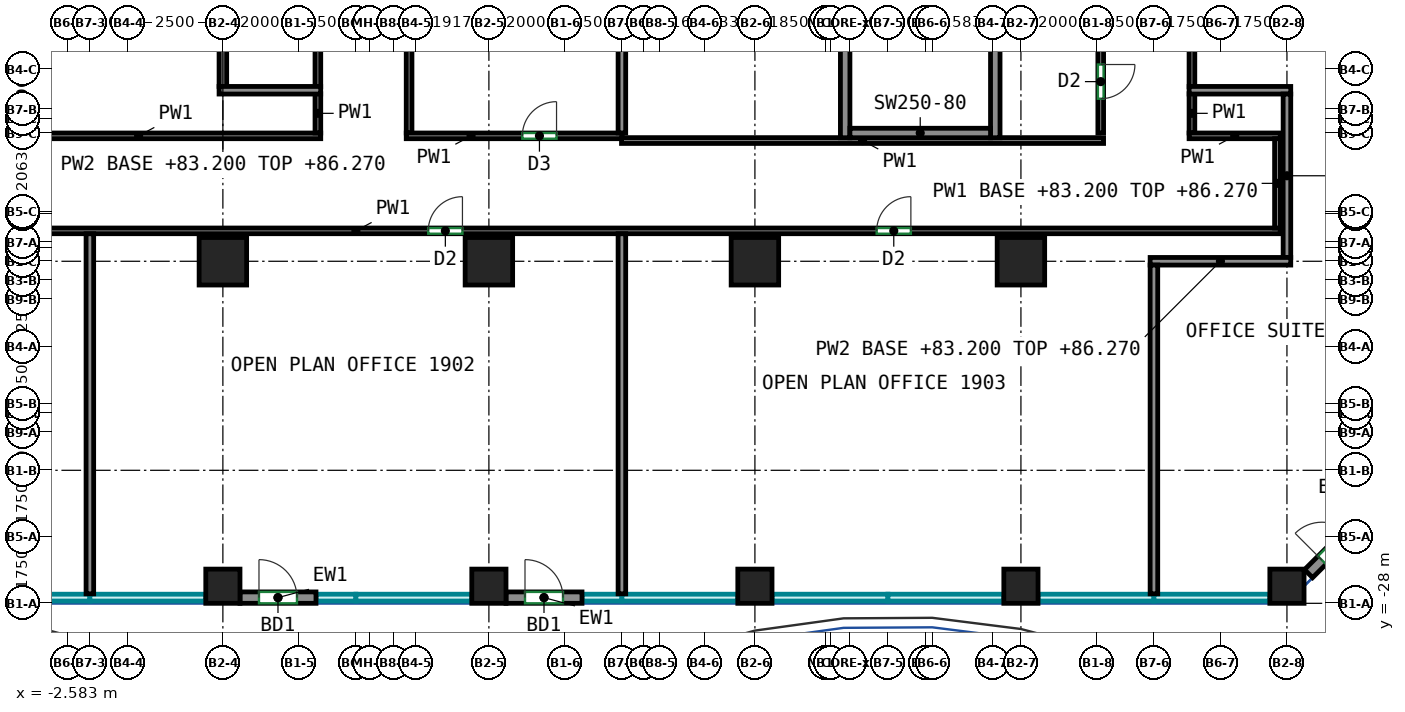
"""IFC4 building model, lengths in metres.
Left out: names, types, materials, properties, quantities, classifications, styles, units other than length and angle.
Written with IfcOpenShell. Run it as: python <this file> out.ifc"""

import sys

from ifc_helpers import new_model, si_unit, direction, frame, frame_2d, origin, origin_2d, place, context, subcontext, project, spatial, rectangle, extrude, source, transform, mapped, element, fill, save


model = new_model("IFC4")
c1 = context("Model", 3, precision=1e-05, world=origin(), true_north=direction((0.0, 1.0)))
c2 = subcontext(c1, "Body", "Model", "MODEL_VIEW")
j1 = project(units=[si_unit("LENGTHUNIT", "METRE"), si_unit("PLANEANGLEUNIT", "RADIAN")], contexts=[c1])
p1 = place(None, origin())
s1 = spatial("IfcSite", under=j1, at=p1, CompositionType="ELEMENT")
p2 = place(p1, origin())
s2 = spatial("IfcBuilding", under=s1, at=p2, CompositionType="ELEMENT")
p3 = place(p2, frame((0.0, 0.0, 83.2)))
s3 = spatial("IfcBuildingStorey", under=s2, at=p3, CompositionType="ELEMENT", Elevation=83.2)
m1 = source(origin(), c2, "Body", "SweptSolid", [
    extrude(rectangle(XDim=0.9, YDim=0.9, at=origin_2d()), origin(), (0.0, 0.0, 1.0), 3.72),
])
p4 = place(p3, frame((1.5, -27.55, 0.0), z_axis=(0.0, 0.0, 1.0), x_axis=(1.0, 0.0, 0.0)))
e1 = element("IfcColumn", 1, at=p4, inside=s3, PredefinedType="COLUMN", context=c2, shape_type="MappedRepresentation", body=[
    mapped(m1, transform((0.0, 0.0, 0.0))),
])
m2 = source(origin(), c2, "Body", "SweptSolid", [
    extrude(rectangle(XDim=1.25, YDim=1.25, at=origin_2d()), origin(), (0.0, 0.0, 1.0), 3.72),
])
p5 = place(p3, frame((1.5, -19.0, 0.0), z_axis=(0.0, 0.0, 1.0), x_axis=(1.0, 0.0, 0.0)))
e2 = element("IfcColumn", 2, at=p5, inside=s3, PredefinedType="COLUMN", context=c2, shape_type="MappedRepresentation", body=[
    mapped(m2, transform((0.0, 0.0, 0.0))),
])
p6 = place(p3, frame((8.5, -27.55, 0.0), z_axis=(0.0, 0.0, 1.0), x_axis=(1.0, 0.0, 0.0)))
e3 = element("IfcColumn", 3, at=p6, inside=s3, PredefinedType="COLUMN", context=c2, shape_type="MappedRepresentation", body=[
    mapped(m1, transform((0.0, 0.0, 0.0))),
])
p7 = place(p3, frame((8.5, -19.0, 0.0), z_axis=(0.0, 0.0, 1.0), x_axis=(1.0, 0.0, 0.0)))
e4 = element("IfcColumn", 4, at=p7, inside=s3, PredefinedType="COLUMN", context=c2, shape_type="MappedRepresentation", body=[
    mapped(m2, transform((0.0, 0.0, 0.0))),
])
p8 = place(p3, frame((15.5, -27.55, 0.0), z_axis=(0.0, 0.0, 1.0), x_axis=(1.0, 0.0, 0.0)))
e5 = element("IfcColumn", 5, at=p8, inside=s3, PredefinedType="COLUMN", context=c2, shape_type="MappedRepresentation", body=[
    mapped(m1, transform((0.0, 0.0, 0.0))),
])
p9 = place(p3, frame((15.5, -19.0, 0.0), z_axis=(0.0, 0.0, 1.0), x_axis=(1.0, 0.0, 0.0)))
e6 = element("IfcColumn", 6, at=p9, inside=s3, PredefinedType="COLUMN", context=c2, shape_type="MappedRepresentation", body=[
    mapped(m2, transform((0.0, 0.0, 0.0))),
])
p10 = place(p3, frame((22.5, -27.55, 0.0), z_axis=(0.0, 0.0, 1.0), x_axis=(1.0, 0.0, 0.0)))
e7 = element("IfcColumn", 7, at=p10, inside=s3, PredefinedType="COLUMN", context=c2, shape_type="MappedRepresentation", body=[
    mapped(m1, transform((0.0, 0.0, 0.0))),
])
p11 = place(p3, frame((22.5, -19.0, 0.0), z_axis=(0.0, 0.0, 1.0), x_axis=(1.0, 0.0, 0.0)))
e8 = element("IfcColumn", 8, at=p11, inside=s3, PredefinedType="COLUMN", context=c2, shape_type="MappedRepresentation", body=[
    mapped(m2, transform((0.0, 0.0, 0.0))),
])
p12 = place(p3, frame((29.5, -27.55, 0.0), z_axis=(0.0, 0.0, 1.0), x_axis=(1.0, 0.0, 0.0)))
e9 = element("IfcColumn", 9, at=p12, inside=s3, PredefinedType="COLUMN", context=c2, shape_type="MappedRepresentation", body=[
    mapped(m1, transform((0.0, 0.0, 0.0))),
])
m3 = source(origin(), c2, "Body", "SweptSolid", [
    extrude(rectangle(XDim=8.0, YDim=0.25, at=frame_2d((4.0, 0.0))), origin(), (0.0, 0.0, 1.0), 3.72),
])
for number, where, z_axis, x_axis in (
    (10, (17.875, -15.75, 0.0), (0.0, 0.0, 1.0), (0.0, 1.0, 0.0)),
    (11, (21.825, -15.75, 0.0), (0.0, 0.0, 1.0), (0.0, 1.0, 0.0)),
):
    element("IfcWall", number, at=place(p3, frame(where, z_axis=z_axis, x_axis=x_axis)), inside=s3, PredefinedType="SHEAR", context=c2, shape_type="MappedRepresentation", body=[
        mapped(m3, transform((0.0, 0.0, 0.0))),
    ])
m4 = source(origin(), c2, "Body", "SweptSolid", [
    extrude(rectangle(XDim=3.7, YDim=0.25, at=frame_2d((1.85, 0.0))), origin(), (0.0, 0.0, 1.0), 3.72),
])
p13 = place(p3, frame((18.0, -15.625, 0.0), z_axis=(0.0, 0.0, 1.0), x_axis=(1.0, 0.0, 0.0)))
e12 = element("IfcWall", 12, at=p13, inside=s3, PredefinedType="SHEAR", context=c2, shape_type="MappedRepresentation", body=[
    mapped(m4, transform((0.0, 0.0, 0.0))),
])
m5 = source(origin(), c2, "Body", "SweptSolid", [
    extrude(rectangle(XDim=2.0, YDim=0.3, at=frame_2d((1.0, 0.0))), origin(), (0.0, 0.0, 1.0), 3.72),
])
p14 = place(p3, frame((1.95, -27.85, 0.0), z_axis=(0.0, 0.0, 1.0), x_axis=(1.0, 0.0, 0.0)))
e13 = element("IfcWall", 13, at=p14, inside=s3, PredefinedType="SOLIDWALL", context=c2, shape_type="MappedRepresentation", body=[
    mapped(m5, transform((0.0, 0.0, 0.0))),
])
p15 = place(p14, frame((0.5, 0.0, 0.0)))
e14 = element("IfcOpeningElement", 14, at=p15, cuts=e13, PredefinedType="OPENING", context=c2, shape_type="SweptSolid", body=[
    extrude(rectangle(XDim=1.0, YDim=2.1, at=frame_2d((0.5, 1.05))), frame((0.0, 0.16, 0.0), z_axis=(0.0, -1.0, 0.0), x_axis=(1.0, 0.0, 0.0)), (0.0, 0.0, 1.0), 0.32),
])
p16 = place(p3, frame((8.95, -27.85, 0.0), z_axis=(0.0, 0.0, 1.0), x_axis=(1.0, 0.0, 0.0)))
e15 = element("IfcWall", 15, at=p16, inside=s3, PredefinedType="SOLIDWALL", context=c2, shape_type="MappedRepresentation", body=[
    mapped(m5, transform((0.0, 0.0, 0.0))),
])
p17 = place(p16, frame((0.5, 0.0, 0.0)))
e16 = element("IfcOpeningElement", 16, at=p17, cuts=e15, PredefinedType="OPENING", context=c2, shape_type="SweptSolid", body=[
    extrude(rectangle(XDim=1.0, YDim=2.1, at=frame_2d((0.5, 1.05))), frame((0.0, 0.16, 0.0), z_axis=(0.0, -1.0, 0.0), x_axis=(1.0, 0.0, 0.0)), (0.0, 0.0, 1.0), 0.32),
])
m6 = source(origin(), c2, "Body", "SweptSolid", [
    extrude(rectangle(XDim=2.0, YDim=0.3, at=frame_2d((1.0, 0.0))), origin(), (0.0, 0.0, 1.0), 3.72),
])
p18 = place(p3, frame((30.069, -27.219, 0.0), z_axis=(0.0, 0.0, 1.0), x_axis=(0.707106781187, 0.707106781187, 0.0)))
e17 = element("IfcWall", 17, at=p18, inside=s3, PredefinedType="SOLIDWALL", context=c2, shape_type="MappedRepresentation", body=[
    mapped(m6, transform((0.0, 0.0, 0.0))),
])
p19 = place(p18, frame((0.5, 0.0, 0.0)))
e18 = element("IfcOpeningElement", 18, at=p19, cuts=e17, PredefinedType="OPENING", context=c2, shape_type="SweptSolid", body=[
    extrude(rectangle(XDim=1.0, YDim=2.1, at=frame_2d((0.5, 1.05))), frame((0.0, 0.16, 0.0), z_axis=(0.0, -1.0, 0.0), x_axis=(1.0, 0.0, 0.0)), (0.0, 0.0, 1.0), 0.32),
])
p20 = place(p3, frame((-19.325, -18.2, 0.0), z_axis=(0.0, 0.0, 1.0), x_axis=(1.0, 0.0, 0.0)))
e19 = element("IfcWall", 19, at=p20, inside=s3, PredefinedType="PARTITIONING", context=c2, shape_type="SweptSolid", body=[
    extrude(rectangle(XDim=48.65, YDim=0.15, at=frame_2d((24.325, 0.0))), origin(), (0.0, 0.0, 1.0), 3.72),
])
p21 = place(p20, frame((12.221, 0.0, 0.0)))
e20 = element("IfcOpeningElement", 20, at=p21, cuts=e19, PredefinedType="OPENING", context=c2, shape_type="SweptSolid", body=[
    extrude(rectangle(XDim=0.9, YDim=2.1, at=frame_2d((0.45, 1.05))), frame((0.0, 0.085, 0.0), z_axis=(0.0, -1.0, 0.0), x_axis=(1.0, 0.0, 0.0)), (0.0, 0.0, 1.0), 0.17),
])
p22 = place(p20, frame((26.229, 0.0, 0.0)))
e21 = element("IfcOpeningElement", 21, at=p22, cuts=e19, PredefinedType="OPENING", context=c2, shape_type="SweptSolid", body=[
    extrude(rectangle(XDim=0.9, YDim=2.1, at=frame_2d((0.45, 1.05))), frame((0.0, 0.085, 0.0), z_axis=(0.0, -1.0, 0.0), x_axis=(1.0, 0.0, 0.0)), (0.0, 0.0, 1.0), 0.17),
])
p23 = place(p20, frame((38.029, 0.0, 0.0)))
e22 = element("IfcOpeningElement", 22, at=p23, cuts=e19, PredefinedType="OPENING", context=c2, shape_type="SweptSolid", body=[
    extrude(rectangle(XDim=0.9, YDim=2.1, at=frame_2d((0.45, 1.05))), frame((0.0, 0.085, 0.0), z_axis=(0.0, -1.0, 0.0), x_axis=(1.0, 0.0, 0.0)), (0.0, 0.0, 1.0), 0.17),
])
p24 = place(p3, frame((-5.51, -15.7, 0.0), z_axis=(0.0, 0.0, 1.0), x_axis=(1.0, 0.0, 0.0)))
e23 = element("IfcWall", 23, at=p24, inside=s3, PredefinedType="PARTITIONING", context=c2, shape_type="SweptSolid", body=[
    extrude(rectangle(XDim=9.585, YDim=0.15, at=frame_2d((4.792, 0.0))), origin(), (0.0, 0.0, 1.0), 3.72),
])
p25 = place(p24, frame((1.21, 0.0, 0.0)))
e24 = element("IfcOpeningElement", 24, at=p25, cuts=e23, PredefinedType="OPENING", context=c2, shape_type="SweptSolid", body=[
    extrude(rectangle(XDim=0.9, YDim=2.1, at=frame_2d((0.45, 1.05))), frame((0.0, 0.085, 0.0), z_axis=(0.0, -1.0, 0.0), x_axis=(1.0, 0.0, 0.0)), (0.0, 0.0, 1.0), 0.17),
])
p26 = place(p3, frame((4.0, -15.625, 0.0), z_axis=(0.0, 0.0, 1.0), x_axis=(0.0, 1.0, 0.0)))
e25 = element("IfcWall", 25, at=p26, inside=s3, PredefinedType="PARTITIONING", context=c2, shape_type="SweptSolid", body=[
    extrude(rectangle(XDim=1.035, YDim=0.15, at=frame_2d((0.518, 0.0))), origin(), (0.0, 0.0, 1.0), 3.72),
])
p27 = place(p3, frame((4.0, -14.41, 0.0), z_axis=(0.0, 0.0, 1.0), x_axis=(0.0, 1.0, 0.0)))
e26 = element("IfcWall", 26, at=p27, inside=s3, PredefinedType="PARTITIONING", context=c2, shape_type="SweptSolid", body=[
    extrude(rectangle(XDim=16.635, YDim=0.15, at=frame_2d((8.317, 0.0))), origin(), (0.0, 0.0, 1.0), 3.72),
])
p28 = place(p27, frame((6.114, 0.0, 0.0)))
e27 = element("IfcOpeningElement", 27, at=p28, cuts=e26, PredefinedType="OPENING", context=c2, shape_type="SweptSolid", body=[
    extrude(rectangle(XDim=1.0, YDim=2.1, at=frame_2d((0.5, 1.05))), frame((0.0, 0.085, 0.0), z_axis=(0.0, -1.0, 0.0), x_axis=(1.0, 0.0, 0.0)), (0.0, 0.0, 1.0), 0.17),
])
p29 = place(p3, frame((27.0, -15.625, 0.0), z_axis=(0.0, 0.0, 1.0), x_axis=(0.0, 1.0, 0.0)))
e28 = element("IfcWall", 28, at=p29, inside=s3, PredefinedType="PARTITIONING", context=c2, shape_type="SweptSolid", body=[
    extrude(rectangle(XDim=1.035, YDim=0.15, at=frame_2d((0.518, 0.0))), origin(), (0.0, 0.0, 1.0), 3.72),
])
p30 = place(p3, frame((26.925, -15.7, 0.0), z_axis=(0.0, 0.0, 1.0), x_axis=(1.0, 0.0, 0.0)))
e29 = element("IfcWall", 29, at=p30, inside=s3, PredefinedType="PARTITIONING", context=c2, shape_type="SweptSolid", body=[
    extrude(rectangle(XDim=2.4, YDim=0.15, at=frame_2d((1.2, 0.0))), origin(), (0.0, 0.0, 1.0), 3.72),
])
p31 = place(p3, frame((29.25, -18.125, 0.0), z_axis=(0.0, 0.0, 1.0), x_axis=(0.0, 1.0, 0.0)))
e30 = element("IfcWall", 30, at=p31, inside=s3, PredefinedType="PARTITIONING", context=c2, shape_type="SweptSolid", body=[
    extrude(rectangle(XDim=2.35, YDim=0.15, at=frame_2d((1.175, 0.0))), origin(), (0.0, 0.0, 1.0), 3.07),
])
p32 = place(p3, frame((6.4, -15.625, 0.0), z_axis=(0.0, 0.0, 1.0), x_axis=(0.0, 1.0, 0.0)))
e31 = element("IfcWall", 31, at=p32, inside=s3, PredefinedType="PARTITIONING", context=c2, shape_type="SweptSolid", body=[
    extrude(rectangle(XDim=5.535, YDim=0.15, at=frame_2d((2.768, 0.0))), origin(), (0.0, 0.0, 1.0), 3.72),
])
p33 = place(p3, frame((6.325, -15.7, 0.0), z_axis=(0.0, 0.0, 1.0), x_axis=(1.0, 0.0, 0.0)))
e32 = element("IfcWall", 32, at=p33, inside=s3, PredefinedType="PARTITIONING", context=c2, shape_type="SweptSolid", body=[
    extrude(rectangle(XDim=5.685, YDim=0.15, at=frame_2d((2.843, 0.0))), origin(), (0.0, 0.0, 1.0), 3.72),
])
p34 = place(p33, frame((3.055, 0.0, 0.0)))
e33 = element("IfcOpeningElement", 33, at=p34, cuts=e32, PredefinedType="OPENING", context=c2, shape_type="SweptSolid", body=[
    extrude(rectangle(XDim=0.9, YDim=2.1, at=frame_2d((0.45, 1.05))), frame((0.0, 0.085, 0.0), z_axis=(0.0, -1.0, 0.0), x_axis=(1.0, 0.0, 0.0)), (0.0, 0.0, 1.0), 0.17),
])
p35 = place(p3, frame((11.99, -15.825, 0.0), z_axis=(0.0, 0.0, 1.0), x_axis=(1.0, 0.0, 0.0)))
e34 = element("IfcWall", 34, at=p35, inside=s3, PredefinedType="PARTITIONING", context=c2, shape_type="SweptSolid", body=[
    extrude(rectangle(XDim=12.685, YDim=0.15, at=frame_2d((6.343, 0.0))), origin(), (0.0, 0.0, 1.0), 3.72),
])
p36 = place(p3, frame((24.6, 2.225, 0.0), z_axis=(0.0, 0.0, 1.0), x_axis=(0.0, -1.0, 0.0)))
e35 = element("IfcWall", 35, at=p36, inside=s3, PredefinedType="PARTITIONING", context=c2, shape_type="SweptSolid", body=[
    extrude(rectangle(XDim=17.85, YDim=0.15, at=frame_2d((8.925, 0.0))), origin(), (0.0, 0.0, 1.0), 3.72),
])
p37 = place(p36, frame((16.048, 0.0, 0.0)))
e36 = element("IfcOpeningElement", 36, at=p37, cuts=e35, PredefinedType="OPENING", context=c2, shape_type="SweptSolid", body=[
    extrude(rectangle(XDim=0.9, YDim=2.1, at=frame_2d((0.45, 1.05))), frame((0.0, 0.085, 0.0), z_axis=(0.0, -1.0, 0.0), x_axis=(1.0, 0.0, 0.0)), (0.0, 0.0, 1.0), 0.17),
])
p38 = place(p3, frame((27.0, -14.41, 0.0), z_axis=(0.0, 0.0, 1.0), x_axis=(0.0, 1.0, 0.0)))
e37 = element("IfcWall", 37, at=p38, inside=s3, PredefinedType="PARTITIONING", context=c2, shape_type="SweptSolid", body=[
    extrude(rectangle(XDim=16.635, YDim=0.15, at=frame_2d((8.317, 0.0))), origin(), (0.0, 0.0, 1.0), 3.72),
])
p39 = place(p38, frame((4.41, 0.0, 0.0)))
e38 = element("IfcOpeningElement", 38, at=p39, cuts=e37, PredefinedType="OPENING", context=c2, shape_type="SweptSolid", body=[
    extrude(rectangle(XDim=1.0, YDim=2.1, at=frame_2d((0.5, 1.05))), frame((0.0, 0.085, 0.0), z_axis=(0.0, -1.0, 0.0), x_axis=(1.0, 0.0, 0.0)), (0.0, 0.0, 1.0), 0.17),
])
p40 = place(p3, frame((-2.0, -27.75, 0.0), z_axis=(0.0, 0.0, 1.0), x_axis=(0.0, 1.0, 0.0)))
e39 = element("IfcWall", 39, at=p40, inside=s3, PredefinedType="PARTITIONING", context=c2, shape_type="SweptSolid", body=[
    extrude(rectangle(XDim=9.474, YDim=0.2, at=frame_2d((4.737, 0.0))), origin(), (0.0, 0.0, 1.0), 3.72),
])
p41 = place(p3, frame((1.5, -14.4, 0.0), z_axis=(0.0, 0.0, 1.0), x_axis=(0.0, 1.0, 0.0)))
e40 = element("IfcWall", 40, at=p41, inside=s3, PredefinedType="PARTITIONING", context=c2, shape_type="SweptSolid", body=[
    extrude(rectangle(XDim=3.775, YDim=0.2, at=frame_2d((1.887, 0.0))), origin(), (0.0, 0.0, 1.0), 3.07),
])
p42 = place(p3, frame((1.4, -14.5, 0.0), z_axis=(0.0, 0.0, 1.0), x_axis=(1.0, 0.0, 0.0)))
e41 = element("IfcWall", 41, at=p42, inside=s3, PredefinedType="PARTITIONING", context=c2, shape_type="SweptSolid", body=[
    extrude(rectangle(XDim=2.674, YDim=0.2, at=frame_2d((1.337, 0.0))), origin(), (0.0, 0.0, 1.0), 3.72),
])
p43 = place(p3, frame((12.0, -27.75, 0.0), z_axis=(0.0, 0.0, 1.0), x_axis=(0.0, 1.0, 0.0)))
e42 = element("IfcWall", 42, at=p43, inside=s3, PredefinedType="PARTITIONING", context=c2, shape_type="SweptSolid", body=[
    extrude(rectangle(XDim=9.474, YDim=0.2, at=frame_2d((4.737, 0.0))), origin(), (0.0, 0.0, 1.0), 3.72),
])
p44 = place(p3, frame((26.926, -14.5, 0.0), z_axis=(0.0, 0.0, 1.0), x_axis=(1.0, 0.0, 0.0)))
e43 = element("IfcWall", 43, at=p44, inside=s3, PredefinedType="PARTITIONING", context=c2, shape_type="SweptSolid", body=[
    extrude(rectangle(XDim=2.674, YDim=0.2, at=frame_2d((1.337, 0.0))), origin(), (0.0, 0.0, 1.0), 3.72),
])
p45 = place(p3, frame((29.5, -18.9, 0.0), z_axis=(0.0, 0.0, 1.0), x_axis=(0.0, 1.0, 0.0)))
e44 = element("IfcWall", 44, at=p45, inside=s3, PredefinedType="PARTITIONING", context=c2, shape_type="SweptSolid", body=[
    extrude(rectangle(XDim=4.3, YDim=0.2, at=frame_2d((2.15, 0.0))), origin(), (0.0, 0.0, 1.0), 3.07),
])
p46 = place(p3, frame((25.9, -19.0, 0.0), z_axis=(0.0, 0.0, 1.0), x_axis=(1.0, 0.0, 0.0)))
e45 = element("IfcWall", 45, at=p46, inside=s3, PredefinedType="PARTITIONING", context=c2, shape_type="SweptSolid", body=[
    extrude(rectangle(XDim=3.7, YDim=0.2, at=frame_2d((1.85, 0.0))), origin(), (0.0, 0.0, 1.0), 3.07),
])
p47 = place(p3, frame((26.0, -27.75, 0.0), z_axis=(0.0, 0.0, 1.0), x_axis=(0.0, 1.0, 0.0)))
e46 = element("IfcWall", 46, at=p47, inside=s3, PredefinedType="PARTITIONING", context=c2, shape_type="SweptSolid", body=[
    extrude(rectangle(XDim=8.65, YDim=0.2, at=frame_2d((4.325, 0.0))), origin(), (0.0, 0.0, 1.0), 3.72),
])
p48 = place(p3, frame((12.0, -15.624, 0.0), z_axis=(0.0, 0.0, 1.0), x_axis=(0.0, 1.0, 0.0)))
e47 = element("IfcWall", 47, at=p48, inside=s3, PredefinedType="PARTITIONING", context=c2, shape_type="SweptSolid", body=[
    extrude(rectangle(XDim=5.524, YDim=0.2, at=frame_2d((2.762, 0.0))), origin(), (0.0, 0.0, 1.0), 3.72),
])
p49 = place(p15, origin())
e48 = element("IfcDoor", 48, at=p49, inside=s3, OperationType="SINGLE_SWING_LEFT", PredefinedType="DOOR", context=c2, shape_type="SweptSolid", body=[
    extrude(rectangle(XDim=1.0, YDim=2.1, at=frame_2d((0.5, 1.05))), frame((0.0, 0.025, 0.0), z_axis=(0.0, -1.0, 0.0), x_axis=(1.0, 0.0, 0.0)), (0.0, 0.0, 1.0), 0.05),
])
fill(e14, e48)
p50 = place(p17, origin())
e49 = element("IfcDoor", 49, at=p50, inside=s3, OperationType="SINGLE_SWING_LEFT", PredefinedType="DOOR", context=c2, shape_type="SweptSolid", body=[
    extrude(rectangle(XDim=1.0, YDim=2.1, at=frame_2d((0.5, 1.05))), frame((0.0, 0.025, 0.0), z_axis=(0.0, -1.0, 0.0), x_axis=(1.0, 0.0, 0.0)), (0.0, 0.0, 1.0), 0.05),
])
fill(e16, e49)
p51 = place(p19, origin())
e50 = element("IfcDoor", 50, at=p51, inside=s3, OperationType="SINGLE_SWING_LEFT", PredefinedType="DOOR", context=c2, shape_type="SweptSolid", body=[
    extrude(rectangle(XDim=1.0, YDim=2.1, at=frame_2d((0.5, 1.05))), frame((0.0, 0.025, 0.0), z_axis=(0.0, -1.0, 0.0), x_axis=(1.0, 0.0, 0.0)), (0.0, 0.0, 1.0), 0.05),
])
fill(e18, e50)
p52 = place(p22, origin())
e51 = element("IfcDoor", 51, at=p52, inside=s3, OperationType="SINGLE_SWING_RIGHT", PredefinedType="DOOR", context=c2, shape_type="SweptSolid", body=[
    extrude(rectangle(XDim=0.9, YDim=2.1, at=frame_2d((0.45, 1.05))), frame((0.0, 0.025, 0.0), z_axis=(0.0, -1.0, 0.0), x_axis=(1.0, 0.0, 0.0)), (0.0, 0.0, 1.0), 0.05),
])
fill(e21, e51)
p53 = place(p23, origin())
e52 = element("IfcDoor", 52, at=p53, inside=s3, OperationType="SINGLE_SWING_RIGHT", PredefinedType="DOOR", context=c2, shape_type="SweptSolid", body=[
    extrude(rectangle(XDim=0.9, YDim=2.1, at=frame_2d((0.45, 1.05))), frame((0.0, 0.025, 0.0), z_axis=(0.0, -1.0, 0.0), x_axis=(1.0, 0.0, 0.0)), (0.0, 0.0, 1.0), 0.05),
])
fill(e22, e52)
p54 = place(p34, origin())
e53 = element("IfcDoor", 53, at=p54, inside=s3, OperationType="SINGLE_SWING_RIGHT", PredefinedType="DOOR", context=c2, shape_type="SweptSolid", body=[
    extrude(rectangle(XDim=0.9, YDim=2.1, at=frame_2d((0.45, 1.05))), frame((0.0, 0.025, 0.0), z_axis=(0.0, -1.0, 0.0), x_axis=(1.0, 0.0, 0.0)), (0.0, 0.0, 1.0), 0.05),
])
fill(e33, e53)
p55 = place(p37, origin())
e54 = element("IfcDoor", 54, at=p55, inside=s3, OperationType="SINGLE_SWING_LEFT", PredefinedType="DOOR", context=c2, shape_type="SweptSolid", body=[
    extrude(rectangle(XDim=0.9, YDim=2.1, at=frame_2d((0.45, 1.05))), frame((0.0, 0.025, 0.0), z_axis=(0.0, -1.0, 0.0), x_axis=(1.0, 0.0, 0.0)), (0.0, 0.0, 1.0), 0.05),
])
fill(e36, e54)
save(model, sys.argv[1])
